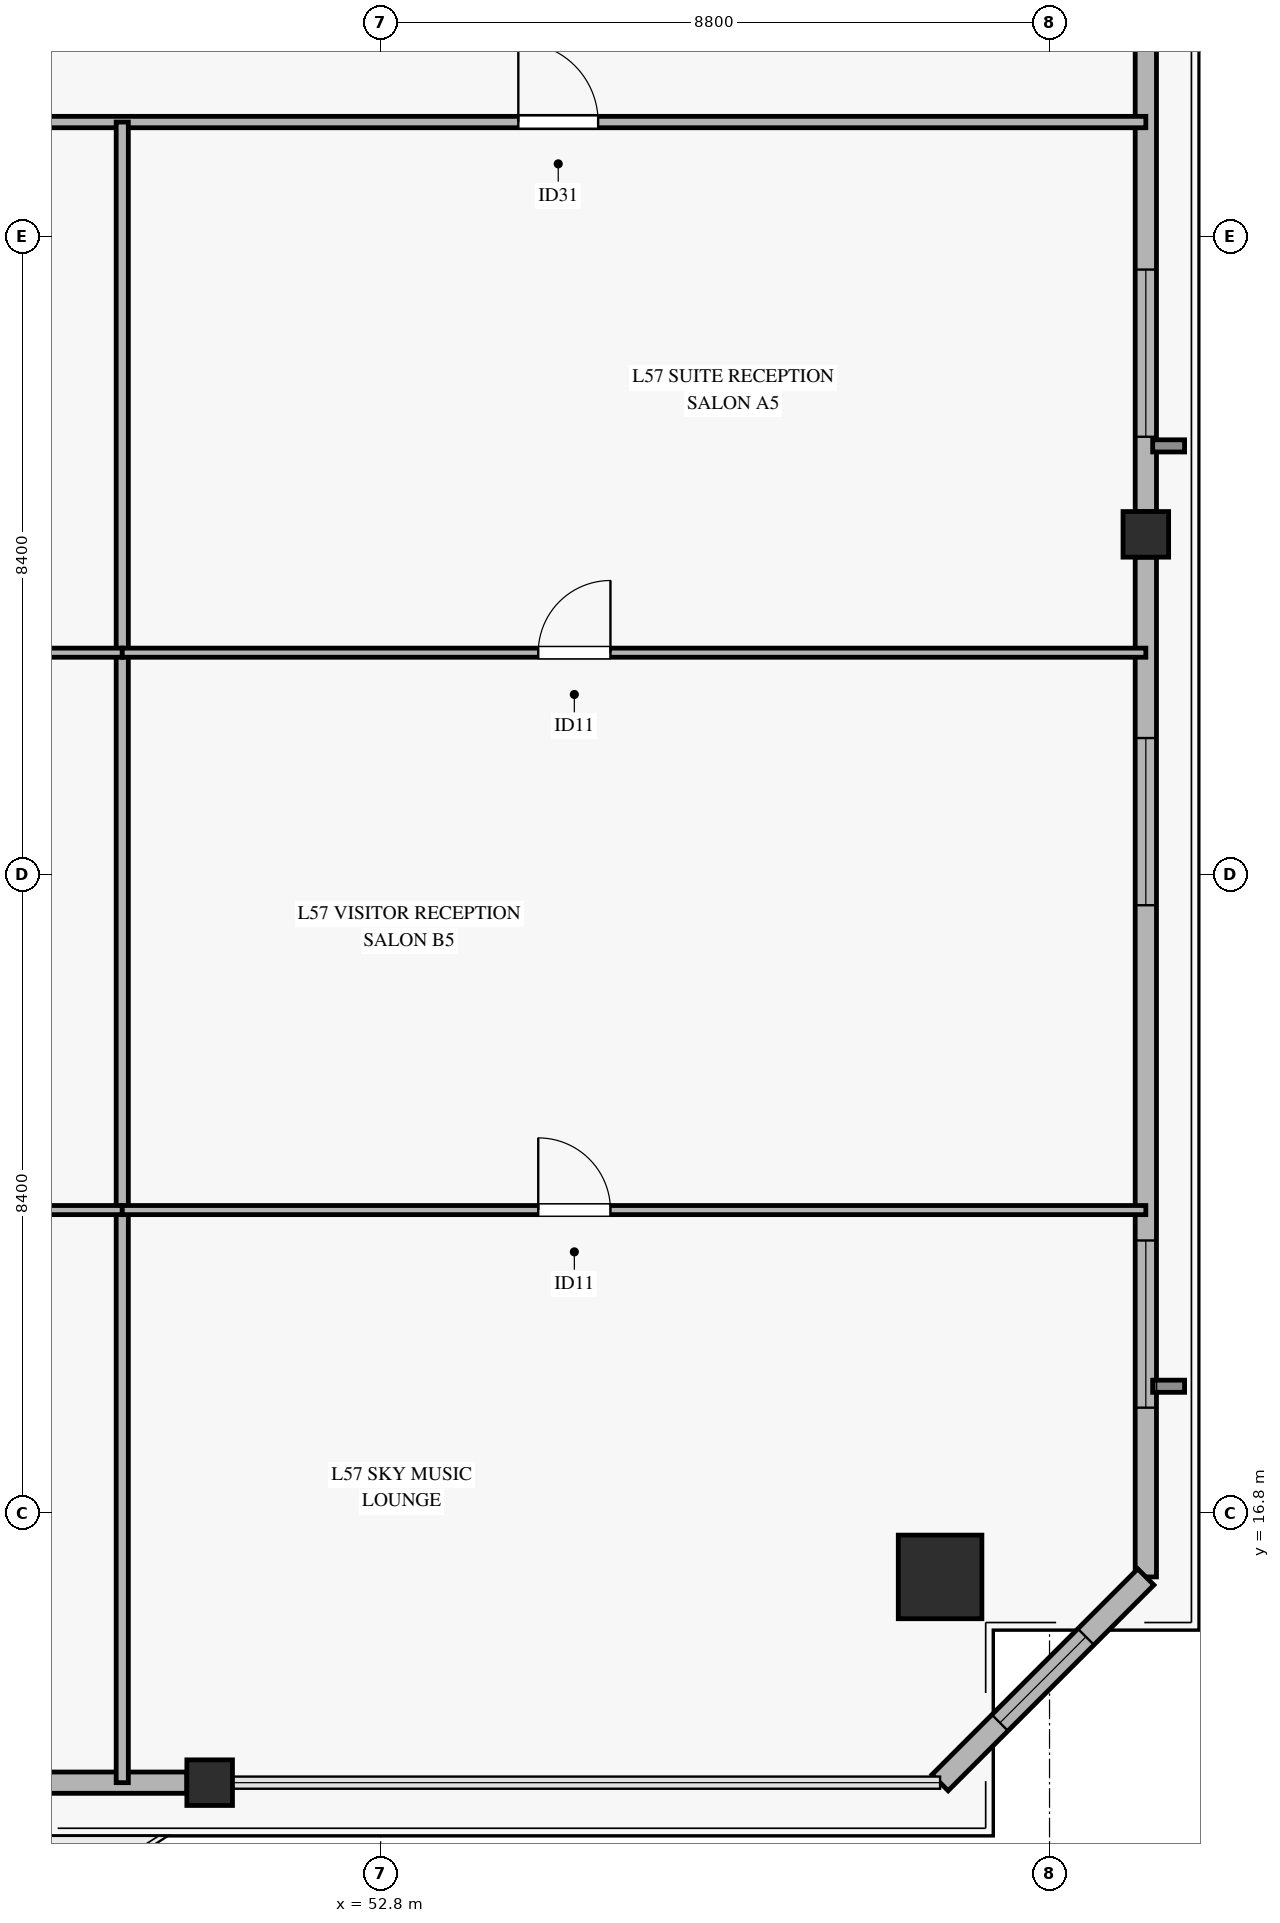
"""IFC4 building model, lengths in metres.
Left out: names, types, materials, properties, quantities, classifications, styles, units other than length and angle.
Written with IfcOpenShell. Run it as: python <this file> out.ifc"""

import sys

from ifc_helpers import new_model, si_unit, direction, frame, frame_2d, origin, origin_2d, place, context, subcontext, project, spatial, rectangle, hollow_rectangle, extrude, source, transform, mapped, element, fill, save


model = new_model("IFC4")
c1 = context("Model", 3, precision=1e-05, world=origin(), true_north=direction((0.0, 1.0)))
c2 = subcontext(c1, "Body", "Model", "MODEL_VIEW")
j1 = project(units=[si_unit("LENGTHUNIT", "METRE"), si_unit("PLANEANGLEUNIT", "RADIAN")], contexts=[c1])
p1 = place(None, origin())
s1 = spatial("IfcSite", under=j1, at=p1, CompositionType="ELEMENT")
p2 = place(p1, origin())
s2 = spatial("IfcBuilding", under=s1, at=p2, CompositionType="ELEMENT")
p3 = place(p2, frame((0.0, 0.0, 227.0)))
s3 = spatial("IfcBuildingStorey", under=s2, at=p3, CompositionType="ELEMENT", Elevation=227.0)
m1 = source(origin(), c2, "Body", "SweptSolid", [
    extrude(hollow_rectangle(XDim=1.1, YDim=1.1, WallThickness=0.05, at=origin_2d()), origin(), (0.0, 0.0, 1.0), 3.185),
])
p4 = place(p3, frame((60.16, 15.957, 0.0), z_axis=(0.0, 0.0, 1.0), x_axis=(1.0, 0.0, 0.0)))
e1 = element("IfcColumn", 1, at=p4, inside=s3, PredefinedType="COLUMN", context=c2, shape_type="MappedRepresentation", body=[
    mapped(m1, transform((0.0, 0.0, 0.0), x_axis=(1.0, 0.0, 0.0), y_axis=(0.0, 1.0, 0.0), z_axis=(0.0, 0.0, 1.0), scale=1.0)),
])
m2 = source(origin(), c2, "Body", "SweptSolid", [
    extrude(hollow_rectangle(XDim=0.6, YDim=0.6, WallThickness=0.028, at=origin_2d()), origin(), (0.0, 0.0, 1.0), 3.185),
])
for number, where, z_axis, x_axis in (
    (2, (50.55, 13.25, 0.0), (0.0, 0.0, 1.0), (1.0, 0.0, 0.0)),
    (3, (62.867, 29.675, 0.0), (0.0, 0.0, 1.0), (1.0, 0.0, 0.0)),
):
    element("IfcColumn", number, at=place(p3, frame(where, z_axis=z_axis, x_axis=x_axis)), inside=s3, PredefinedType="COLUMN", context=c2, shape_type="MappedRepresentation", body=[
        mapped(m2, transform((0.0, 0.0, 0.0), x_axis=(1.0, 0.0, 0.0), y_axis=(0.0, 1.0, 0.0), z_axis=(0.0, 0.0, 1.0), scale=1.0)),
    ])
p5 = place(p3, frame((44.6, 13.25, 0.0), z_axis=(0.0, 0.0, 1.0), x_axis=(1.0, 0.0, 0.0)))
e4 = element("IfcWall", 4, at=p5, inside=s3, PredefinedType="SOLIDWALL", context=c2, shape_type="SweptSolid", body=[
    extrude(rectangle(XDim=5.65, YDim=0.28, at=frame_2d((2.825, 0.0))), origin(), (0.0, 0.0, 1.0), 2.815),
])
p6 = place(p5, frame((1.9, 0.0, 0.0)))
e5 = element("IfcOpeningElement", 5, at=p6, cuts=e4, PredefinedType="OPENING", context=c2, shape_type="SweptSolid", body=[
    extrude(rectangle(XDim=1.8, YDim=2.25, at=frame_2d((0.9, 1.125))), frame((0.0, 0.15, 0.0), z_axis=(0.0, -1.0, 0.0), x_axis=(1.0, 0.0, 0.0)), (0.0, 0.0, 1.0), 0.3),
])
p7 = place(p3, frame((62.867, 15.957, 0.0), z_axis=(0.0, 0.0, 1.0), x_axis=(0.0, 1.0, 0.0)))
e6 = element("IfcWall", 6, at=p7, inside=s3, PredefinedType="SOLIDWALL", context=c2, shape_type="SweptSolid", body=[
    extrude(rectangle(XDim=13.418, YDim=0.28, at=frame_2d((6.709, 0.0))), origin(), (0.0, 0.0, 1.0), 2.815),
])
p8 = place(p7, frame((2.227, 0.0, 0.45)))
e7 = element("IfcOpeningElement", 7, at=p8, cuts=e6, PredefinedType="OPENING", context=c2, shape_type="SweptSolid", body=[
    extrude(rectangle(XDim=2.2, YDim=2.1, at=frame_2d((1.1, 1.05))), frame((0.0, 0.15, 0.0), z_axis=(0.0, -1.0, 0.0), x_axis=(1.0, 0.0, 0.0)), (0.0, 0.0, 1.0), 0.3),
])
p9 = place(p7, frame((8.838, 0.0, 0.45)))
e8 = element("IfcOpeningElement", 8, at=p9, cuts=e6, PredefinedType="OPENING", context=c2, shape_type="SweptSolid", body=[
    extrude(rectangle(XDim=2.2, YDim=2.1, at=frame_2d((1.1, 1.05))), frame((0.0, 0.15, 0.0), z_axis=(0.0, -1.0, 0.0), x_axis=(1.0, 0.0, 0.0)), (0.0, 0.0, 1.0), 0.3),
])
p10 = place(p3, frame((62.867, 29.975, 0.0), z_axis=(0.0, 0.0, 1.0), x_axis=(0.0, 1.0, 0.0)))
e9 = element("IfcWall", 9, at=p10, inside=s3, PredefinedType="SOLIDWALL", context=c2, shape_type="SweptSolid", body=[
    extrude(rectangle(XDim=13.418, YDim=0.28, at=frame_2d((6.709, 0.0))), origin(), (0.0, 0.0, 1.0), 2.815),
])
p11 = place(p10, frame((0.984, 0.0, 0.45)))
e10 = element("IfcOpeningElement", 10, at=p11, cuts=e9, PredefinedType="OPENING", context=c2, shape_type="SweptSolid", body=[
    extrude(rectangle(XDim=2.2, YDim=2.1, at=frame_2d((1.1, 1.05))), frame((0.0, 0.15, 0.0), z_axis=(0.0, -1.0, 0.0), x_axis=(1.0, 0.0, 0.0)), (0.0, 0.0, 1.0), 0.3),
])
p12 = place(p3, frame((60.16, 13.25, 0.0), z_axis=(0.0, 0.0, 1.0), x_axis=(0.707106781187, 0.707106781187, 0.0)))
e11 = element("IfcWall", 11, at=p12, inside=s3, PredefinedType="SOLIDWALL", context=c2, shape_type="SweptSolid", body=[
    extrude(rectangle(XDim=3.828, YDim=0.3, at=frame_2d((1.914, 0.0))), origin(), (0.0, 0.0, 1.0), 2.815),
])
p13 = place(p12, frame((1.114, 0.0, 0.45)))
e12 = element("IfcOpeningElement", 12, at=p13, cuts=e11, PredefinedType="OPENING", context=c2, shape_type="SweptSolid", body=[
    extrude(rectangle(XDim=1.6, YDim=2.0, at=frame_2d((0.8, 1.0))), frame((0.0, 0.16, 0.0), z_axis=(0.0, -1.0, 0.0), x_axis=(1.0, 0.0, 0.0)), (0.0, 0.0, 1.0), 0.32),
])
p14 = place(p3, frame((7.533, 35.1, 0.0), z_axis=(0.0, 0.0, 1.0), x_axis=(1.0, 0.0, 0.0)))
e13 = element("IfcWall", 13, at=p14, inside=s3, PredefinedType="PARTITIONING", context=c2, shape_type="SweptSolid", body=[
    extrude(rectangle(XDim=55.334, YDim=0.15, at=frame_2d((27.667, 0.0))), origin(), (0.0, 0.0, 1.0), 2.37),
])
p15 = place(p14, frame((5.335, 0.0, 0.0)))
e14 = element("IfcOpeningElement", 14, at=p15, cuts=e13, PredefinedType="OPENING", context=c2, shape_type="SweptSolid", body=[
    extrude(rectangle(XDim=1.05, YDim=2.15, at=frame_2d((0.525, 1.075))), frame((0.0, 0.085, 0.0), z_axis=(0.0, -1.0, 0.0), x_axis=(1.0, 0.0, 0.0)), (0.0, 0.0, 1.0), 0.17),
])
p16 = place(p14, frame((17.207, 0.0, 0.0)))
e15 = element("IfcOpeningElement", 15, at=p16, cuts=e13, PredefinedType="OPENING", context=c2, shape_type="SweptSolid", body=[
    extrude(rectangle(XDim=1.05, YDim=2.15, at=frame_2d((0.525, 1.075))), frame((0.0, 0.085, 0.0), z_axis=(0.0, -1.0, 0.0), x_axis=(1.0, 0.0, 0.0)), (0.0, 0.0, 1.0), 0.17),
])
p17 = place(p14, frame((25.884, 0.0, 0.0)))
e16 = element("IfcOpeningElement", 16, at=p17, cuts=e13, PredefinedType="OPENING", context=c2, shape_type="SweptSolid", body=[
    extrude(rectangle(XDim=1.05, YDim=2.15, at=frame_2d((0.525, 1.075))), frame((0.0, 0.085, 0.0), z_axis=(0.0, -1.0, 0.0), x_axis=(1.0, 0.0, 0.0)), (0.0, 0.0, 1.0), 0.17),
])
p18 = place(p14, frame((35.712, 0.0, 0.0)))
e17 = element("IfcOpeningElement", 17, at=p18, cuts=e13, PredefinedType="OPENING", context=c2, shape_type="SweptSolid", body=[
    extrude(rectangle(XDim=1.05, YDim=2.15, at=frame_2d((0.525, 1.075))), frame((0.0, 0.085, 0.0), z_axis=(0.0, -1.0, 0.0), x_axis=(1.0, 0.0, 0.0)), (0.0, 0.0, 1.0), 0.17),
])
p19 = place(p14, frame((47.078, 0.0, 0.0)))
e18 = element("IfcOpeningElement", 18, at=p19, cuts=e13, PredefinedType="OPENING", context=c2, shape_type="SweptSolid", body=[
    extrude(rectangle(XDim=1.05, YDim=2.15, at=frame_2d((0.525, 1.075))), frame((0.0, 0.085, 0.0), z_axis=(0.0, -1.0, 0.0), x_axis=(1.0, 0.0, 0.0)), (0.0, 0.0, 1.0), 0.17),
])
p20 = place(p3, frame((49.4, 13.25, 0.0), z_axis=(0.0, 0.0, 1.0), x_axis=(0.0, 1.0, 0.0)))
e19 = element("IfcWall", 19, at=p20, inside=s3, PredefinedType="PARTITIONING", context=c2, shape_type="SweptSolid", body=[
    extrude(rectangle(XDim=21.85, YDim=0.16, at=frame_2d((10.925, 0.0))), origin(), (0.0, 0.0, 1.0), 2.77),
])
p21 = place(p3, frame((39.2, 20.784, 0.0), z_axis=(0.0, 0.0, 1.0), x_axis=(1.0, 0.0, 0.0)))
e20 = element("IfcWall", 20, at=p21, inside=s3, PredefinedType="PARTITIONING", context=c2, shape_type="SweptSolid", body=[
    extrude(rectangle(XDim=10.2, YDim=0.12, at=frame_2d((5.1, 0.0))), origin(), (0.0, 0.0, 1.0), 2.37),
])
p22 = place(p21, frame((4.246, 0.0, 0.0)))
e21 = element("IfcOpeningElement", 21, at=p22, cuts=e20, PredefinedType="OPENING", context=c2, shape_type="SweptSolid", body=[
    extrude(rectangle(XDim=0.95, YDim=2.1, at=frame_2d((0.475, 1.05))), frame((0.0, 0.07, 0.0), z_axis=(0.0, -1.0, 0.0), x_axis=(1.0, 0.0, 0.0)), (0.0, 0.0, 1.0), 0.14),
])
p23 = place(p3, frame((39.2, 28.118, 0.0), z_axis=(0.0, 0.0, 1.0), x_axis=(1.0, 0.0, 0.0)))
e22 = element("IfcWall", 22, at=p23, inside=s3, PredefinedType="PARTITIONING", context=c2, shape_type="SweptSolid", body=[
    extrude(rectangle(XDim=10.2, YDim=0.12, at=frame_2d((5.1, 0.0))), origin(), (0.0, 0.0, 1.0), 2.37),
])
p24 = place(p23, frame((4.246, 0.0, 0.0)))
e23 = element("IfcOpeningElement", 23, at=p24, cuts=e22, PredefinedType="OPENING", context=c2, shape_type="SweptSolid", body=[
    extrude(rectangle(XDim=0.95, YDim=2.1, at=frame_2d((0.475, 1.05))), frame((0.0, 0.07, 0.0), z_axis=(0.0, -1.0, 0.0), x_axis=(1.0, 0.0, 0.0)), (0.0, 0.0, 1.0), 0.14),
])
p25 = place(p3, frame((49.4, 20.784, 0.0), z_axis=(0.0, 0.0, 1.0), x_axis=(1.0, 0.0, 0.0)))
e24 = element("IfcWall", 24, at=p25, inside=s3, PredefinedType="PARTITIONING", context=c2, shape_type="SweptSolid", body=[
    extrude(rectangle(XDim=13.467, YDim=0.12, at=frame_2d((6.733, 0.0))), origin(), (0.0, 0.0, 1.0), 2.37),
])
p26 = place(p25, frame((5.473, 0.0, 0.0)))
e25 = element("IfcOpeningElement", 25, at=p26, cuts=e24, PredefinedType="OPENING", context=c2, shape_type="SweptSolid", body=[
    extrude(rectangle(XDim=0.95, YDim=2.1, at=frame_2d((0.475, 1.05))), frame((0.0, 0.07, 0.0), z_axis=(0.0, -1.0, 0.0), x_axis=(1.0, 0.0, 0.0)), (0.0, 0.0, 1.0), 0.14),
])
p27 = place(p3, frame((49.4, 28.118, 0.0), z_axis=(0.0, 0.0, 1.0), x_axis=(1.0, 0.0, 0.0)))
e26 = element("IfcWall", 26, at=p27, inside=s3, PredefinedType="PARTITIONING", context=c2, shape_type="SweptSolid", body=[
    extrude(rectangle(XDim=13.467, YDim=0.12, at=frame_2d((6.733, 0.0))), origin(), (0.0, 0.0, 1.0), 2.37),
])
p28 = place(p27, frame((5.473, 0.0, 0.0)))
e27 = element("IfcOpeningElement", 27, at=p28, cuts=e26, PredefinedType="OPENING", context=c2, shape_type="SweptSolid", body=[
    extrude(rectangle(XDim=0.95, YDim=2.1, at=frame_2d((0.475, 1.05))), frame((0.0, 0.07, 0.0), z_axis=(0.0, -1.0, 0.0), x_axis=(1.0, 0.0, 0.0)), (0.0, 0.0, 1.0), 0.14),
])
m3 = source(origin(), c2, "Body", "SweptSolid", [
    extrude(rectangle(XDim=2.2, YDim=2.1, at=frame_2d((1.1, 1.05))), frame((0.0, 0.03, 0.0), z_axis=(0.0, -1.0, 0.0), x_axis=(1.0, 0.0, 0.0)), (0.0, 0.0, 1.0), 0.06),
])
p29 = place(p8, origin())
e28 = element("IfcWindow", 28, at=p29, inside=s3, PartitioningType="SINGLE_PANEL", PredefinedType="WINDOW", context=c2, shape_type="MappedRepresentation", body=[
    mapped(m3, transform((0.0, 0.0, 0.0), x_axis=(1.0, 0.0, 0.0), y_axis=(0.0, 1.0, 0.0), z_axis=(0.0, 0.0, 1.0), scale=1.0)),
])
fill(e7, e28)
p30 = place(p9, origin())
e29 = element("IfcWindow", 29, at=p30, inside=s3, PartitioningType="SINGLE_PANEL", PredefinedType="WINDOW", context=c2, shape_type="MappedRepresentation", body=[
    mapped(m3, transform((0.0, 0.0, 0.0), x_axis=(1.0, 0.0, 0.0), y_axis=(0.0, 1.0, 0.0), z_axis=(0.0, 0.0, 1.0), scale=1.0)),
])
fill(e8, e29)
p31 = place(p11, origin())
e30 = element("IfcWindow", 30, at=p31, inside=s3, PartitioningType="SINGLE_PANEL", PredefinedType="WINDOW", context=c2, shape_type="MappedRepresentation", body=[
    mapped(m3, transform((0.0, 0.0, 0.0), x_axis=(1.0, 0.0, 0.0), y_axis=(0.0, 1.0, 0.0), z_axis=(0.0, 0.0, 1.0), scale=1.0)),
])
fill(e10, e30)
m4 = source(origin(), c2, "Body", "SweptSolid", [
    extrude(rectangle(XDim=1.6, YDim=2.0, at=frame_2d((0.8, 1.0))), frame((0.0, 0.03, 0.0), z_axis=(0.0, -1.0, 0.0), x_axis=(1.0, 0.0, 0.0)), (0.0, 0.0, 1.0), 0.06),
])
p32 = place(p13, origin())
e31 = element("IfcWindow", 31, at=p32, inside=s3, PartitioningType="SINGLE_PANEL", PredefinedType="WINDOW", context=c2, shape_type="MappedRepresentation", body=[
    mapped(m4, transform((0.0, 0.0, 0.0), x_axis=(1.0, 0.0, 0.0), y_axis=(0.0, 1.0, 0.0), z_axis=(0.0, 0.0, 1.0), scale=1.0)),
])
fill(e12, e31)
m5 = source(origin(), c2, "Body", "SweptSolid", [
    extrude(rectangle(XDim=1.05, YDim=2.15, at=frame_2d((0.525, 1.075))), frame((0.0, 0.025, 0.0), z_axis=(0.0, -1.0, 0.0), x_axis=(1.0, 0.0, 0.0)), (0.0, 0.0, 1.0), 0.05),
])
p33 = place(p19, origin())
e32 = element("IfcDoor", 32, at=p33, inside=s3, OperationType="SINGLE_SWING_LEFT", PredefinedType="DOOR", context=c2, shape_type="MappedRepresentation", body=[
    mapped(m5, transform((0.0, 0.0, 0.0), x_axis=(1.0, 0.0, 0.0), y_axis=(0.0, 1.0, 0.0), z_axis=(0.0, 0.0, 1.0), scale=1.0)),
])
fill(e18, e32)
m6 = source(origin(), c2, "Body", "SweptSolid", [
    extrude(rectangle(XDim=0.95, YDim=2.1, at=frame_2d((0.475, 1.05))), frame((0.0, 0.025, 0.0), z_axis=(0.0, -1.0, 0.0), x_axis=(1.0, 0.0, 0.0)), (0.0, 0.0, 1.0), 0.05),
])
p34 = place(p28, origin())
e33 = element("IfcDoor", 33, at=p34, inside=s3, OperationType="SINGLE_SWING_RIGHT", PredefinedType="DOOR", context=c2, shape_type="MappedRepresentation", body=[
    mapped(m6, transform((0.0, 0.0, 0.0), x_axis=(1.0, 0.0, 0.0), y_axis=(0.0, 1.0, 0.0), z_axis=(0.0, 0.0, 1.0), scale=1.0)),
])
fill(e27, e33)
p35 = place(p26, origin())
e34 = element("IfcDoor", 34, at=p35, inside=s3, OperationType="SINGLE_SWING_LEFT", PredefinedType="DOOR", context=c2, shape_type="MappedRepresentation", body=[
    mapped(m6, transform((0.0, 0.0, 0.0), x_axis=(1.0, 0.0, 0.0), y_axis=(0.0, 1.0, 0.0), z_axis=(0.0, 0.0, 1.0), scale=1.0)),
])
fill(e25, e34)
save(model, sys.argv[1])
